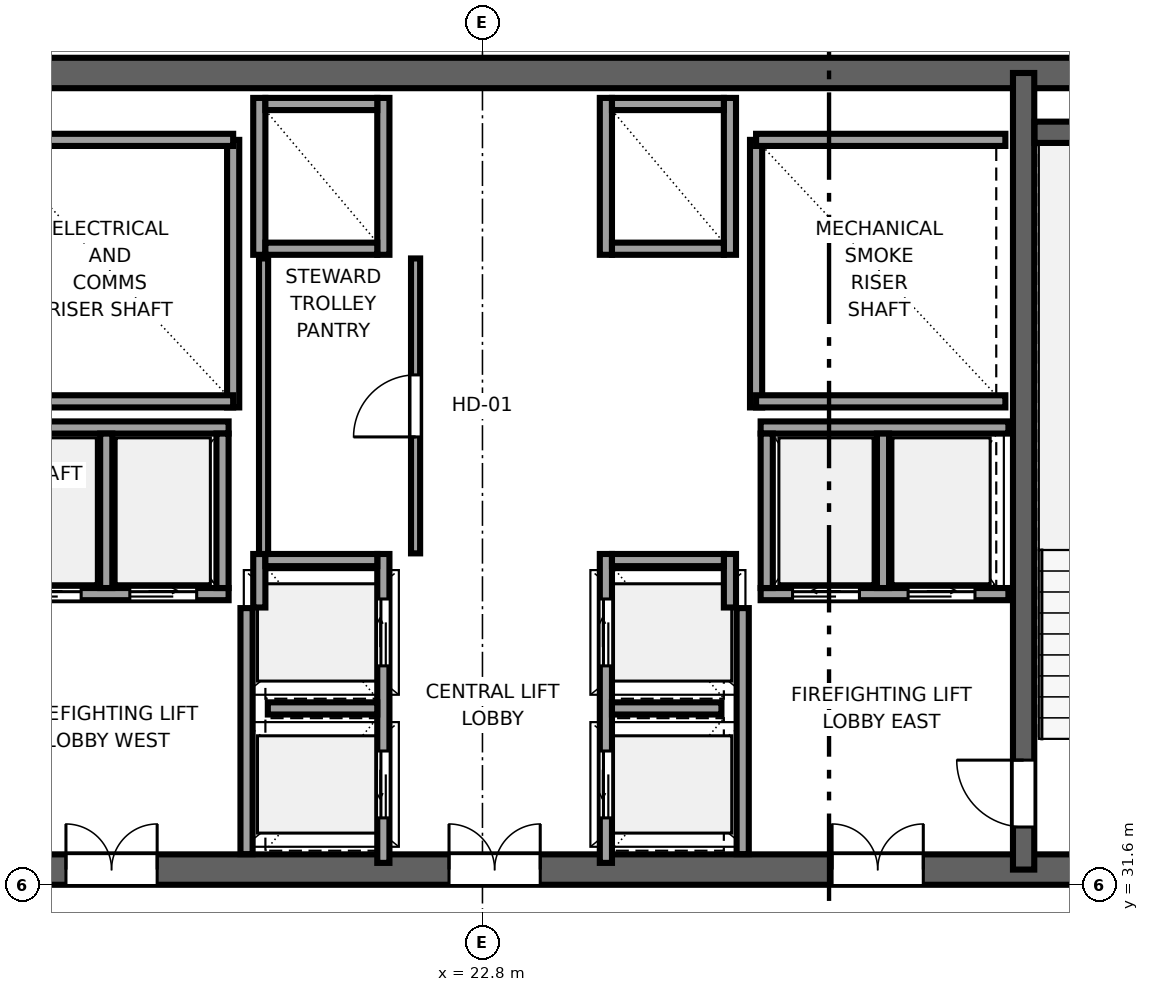
"""IFC4 building model, lengths in metres.
Left out: names, types, materials, properties, quantities, classifications, styles, units other than length and angle.
Written with IfcOpenShell. Run it as: python <this file> out.ifc"""

import sys

from ifc_helpers import new_model, si_unit, direction, frame, frame_2d, origin, place, context, subcontext, project, spatial, rectangle, extrude, source, transform, mapped, element, fill, save


model = new_model("IFC4")
c1 = context("Model", 3, precision=1e-05, world=origin(), true_north=direction((0.0, 1.0)))
c2 = subcontext(c1, "Body", "Model", "MODEL_VIEW")
j1 = project(units=[si_unit("LENGTHUNIT", "METRE"), si_unit("PLANEANGLEUNIT", "RADIAN")], contexts=[c1])
p1 = place(None, origin())
s1 = spatial("IfcSite", under=j1, at=p1, CompositionType="ELEMENT")
p2 = place(p1, origin())
s2 = spatial("IfcBuilding", under=s1, at=p2, CompositionType="ELEMENT")
p3 = place(p2, frame((0.0, 0.0, 220.35)))
s3 = spatial("IfcBuildingStorey", under=s2, at=p3, CompositionType="ELEMENT", Elevation=220.35)
p4 = place(p3, frame((10.0, 31.85, 0.0), z_axis=(0.0, 0.0, 1.0), x_axis=(1.0, 0.0, 0.0)))
e1 = element("IfcWall", 1, at=p4, inside=s3, PredefinedType="SHEAR", context=c2, shape_type="SweptSolid", body=[
    extrude(rectangle(XDim=26.0, YDim=0.5, at=frame_2d((13.0, 0.0))), origin(), (0.0, 0.0, 1.0), 3.55),
])
p5 = place(p4, frame((7.45, 0.0, 0.0), z_axis=(0.0, 0.0, 1.0), x_axis=(-1.0, 0.0, 0.0)))
e2 = element("IfcOpeningElement", 2, at=p5, cuts=e1, PredefinedType="OPENING", context=c2, shape_type="SweptSolid", body=[
    extrude(rectangle(XDim=1.5, YDim=2.04, at=frame_2d((0.75, 1.02))), frame((0.0, 0.26, 0.0), z_axis=(0.0, -1.0, 0.0), x_axis=(1.0, 0.0, 0.0)), (0.0, 0.0, 1.0), 0.52),
])
p6 = place(p4, frame((13.75, 0.0, 0.0), z_axis=(0.0, 0.0, 1.0), x_axis=(-1.0, 0.0, 0.0)))
e3 = element("IfcOpeningElement", 3, at=p6, cuts=e1, PredefinedType="OPENING", context=c2, shape_type="SweptSolid", body=[
    extrude(rectangle(XDim=1.5, YDim=2.04, at=frame_2d((0.75, 1.02))), frame((0.0, 0.26, 0.0), z_axis=(0.0, -1.0, 0.0), x_axis=(1.0, 0.0, 0.0)), (0.0, 0.0, 1.0), 0.52),
])
p7 = place(p4, frame((20.05, 0.0, 0.0), z_axis=(0.0, 0.0, 1.0), x_axis=(-1.0, 0.0, 0.0)))
e4 = element("IfcOpeningElement", 4, at=p7, cuts=e1, PredefinedType="OPENING", context=c2, shape_type="SweptSolid", body=[
    extrude(rectangle(XDim=1.5, YDim=2.04, at=frame_2d((0.75, 1.02))), frame((0.0, 0.26, 0.0), z_axis=(0.0, -1.0, 0.0), x_axis=(1.0, 0.0, 0.0)), (0.0, 0.0, 1.0), 0.52),
])
p8 = place(p3, frame((10.0, 44.95, 0.0), z_axis=(0.0, 0.0, 1.0), x_axis=(1.0, 0.0, 0.0)))
e5 = element("IfcWall", 5, at=p8, inside=s3, PredefinedType="SHEAR", context=c2, shape_type="SweptSolid", body=[
    extrude(rectangle(XDim=26.0, YDim=0.5, at=frame_2d((13.0, 0.0))), origin(), (0.0, 0.0, 1.0), 3.55),
])
p9 = place(p3, frame((31.7, 31.85, 0.0), z_axis=(0.0, 0.0, 1.0), x_axis=(0.0, 1.0, 0.0)))
e6 = element("IfcWall", 6, at=p9, inside=s3, PredefinedType="SHEAR", context=c2, shape_type="SweptSolid", body=[
    extrude(rectangle(XDim=13.1, YDim=0.35, at=frame_2d((6.55, 0.0))), origin(), (0.0, 0.0, 1.0), 3.55),
])
p10 = place(p9, frame((1.8, 0.0, 0.0), z_axis=(0.0, 0.0, 1.0), x_axis=(-1.0, 0.0, 0.0)))
e7 = element("IfcOpeningElement", 7, at=p10, cuts=e6, PredefinedType="OPENING", context=c2, shape_type="SweptSolid", body=[
    extrude(rectangle(XDim=1.1, YDim=2.12, at=frame_2d((0.55, 1.06))), frame((0.0, 0.185, 0.0), z_axis=(0.0, -1.0, 0.0), x_axis=(1.0, 0.0, 0.0)), (0.0, 0.0, 1.0), 0.37),
])
p11 = place(p3, frame((31.88, 43.975, 0.0), z_axis=(0.0, 0.0, 1.0), x_axis=(1.0, 0.0, 0.0)))
e8 = element("IfcWall", 8, at=p11, inside=s3, PredefinedType="SHEAR", context=c2, shape_type="SweptSolid", body=[
    extrude(rectangle(XDim=3.6, YDim=0.35, at=frame_2d((1.8, 0.0))), origin(), (0.0, 0.0, 1.0), 3.55),
])
p12 = place(p3, frame((18.7, 39.45, 0.0), z_axis=(0.0, 0.0, 1.0), x_axis=(0.0, 1.0, 0.0)))
e9 = element("IfcWall", 9, at=p12, inside=s3, PredefinedType="SOLIDWALL", context=c2, shape_type="SweptSolid", body=[
    extrude(rectangle(XDim=4.4, YDim=0.2, at=frame_2d((2.2, 0.0))), origin(), (0.0, 0.0, 1.0), 3.37),
])
for number, where, z_axis, x_axis in (
    (10, (14.6, 39.55, 0.0), (0.0, 0.0, 1.0), (1.0, 0.0, 0.0)),
    (11, (14.6, 43.85, 0.0), (0.0, 0.0, 1.0), (1.0, 0.0, 0.0)),
):
    element("IfcWall", number, at=place(p3, frame(where, z_axis=z_axis, x_axis=x_axis)), inside=s3, PredefinedType="SOLIDWALL", context=c2, shape_type="SweptSolid", body=[
        extrude(rectangle(XDim=4.1, YDim=0.2, at=frame_2d((2.05, 0.0))), origin(), (0.0, 0.0, 1.0), 3.37),
    ])
p13 = place(p3, frame((27.3, 39.45, 0.0), z_axis=(0.0, 0.0, 1.0), x_axis=(0.0, 1.0, 0.0)))
e12 = element("IfcWall", 12, at=p13, inside=s3, PredefinedType="SOLIDWALL", context=c2, shape_type="SweptSolid", body=[
    extrude(rectangle(XDim=4.4, YDim=0.2, at=frame_2d((2.2, 0.0))), origin(), (0.0, 0.0, 1.0), 3.37),
])
for number, where, z_axis, x_axis in (
    (13, (27.3, 39.55, 0.0), (0.0, 0.0, 1.0), (1.0, 0.0, 0.0)),
    (14, (27.3, 43.85, 0.0), (0.0, 0.0, 1.0), (1.0, 0.0, 0.0)),
):
    element("IfcWall", number, at=place(p3, frame(where, z_axis=z_axis, x_axis=x_axis)), inside=s3, PredefinedType="SOLIDWALL", context=c2, shape_type="SweptSolid", body=[
        extrude(rectangle(XDim=4.1, YDim=0.2, at=frame_2d((2.05, 0.0))), origin(), (0.0, 0.0, 1.0), 3.37),
    ])
for number, where, z_axis, x_axis in (
    (15, (18.92, 32.104, 0.0), (0.0, 0.0, 1.0), (0.0, 1.0, 0.0)),
    (16, (27.08, 32.104, 0.0), (0.0, 0.0, 1.0), (0.0, 1.0, 0.0)),
):
    element("IfcWall", number, at=place(p3, frame(where, z_axis=z_axis, x_axis=x_axis)), inside=s3, PredefinedType="SOLIDWALL", context=c2, shape_type="SweptSolid", body=[
        extrude(rectangle(XDim=4.046, YDim=0.2, at=frame_2d((2.023, 0.0))), origin(), (0.0, 0.0, 1.0), 3.37),
    ])
p14 = place(p3, frame((21.17, 31.96, 0.0), z_axis=(0.0, 0.0, 1.0), x_axis=(0.0, 1.0, 0.0)))
e17 = element("IfcWall", 17, at=p14, inside=s3, PredefinedType="SOLIDWALL", context=c2, shape_type="SweptSolid", body=[
    extrude(rectangle(XDim=5.08, YDim=0.2, at=frame_2d((2.54, 0.0))), origin(), (0.0, 0.0, 1.0), 3.37),
])
p15 = place(p14, frame((0.74, 0.0, 0.0)))
e18 = element("IfcOpeningElement", 18, at=p15, cuts=e17, PredefinedType="OPENING", context=c2, shape_type="SweptSolid", body=[
    extrude(rectangle(XDim=1.1, YDim=2.12, at=frame_2d((0.55, 1.06))), frame((0.0, 0.11, 0.0), z_axis=(0.0, -1.0, 0.0), x_axis=(1.0, 0.0, 0.0)), (0.0, 0.0, 1.0), 0.22),
])
p16 = place(p14, frame((3.24, 0.0, 0.0)))
e19 = element("IfcOpeningElement", 19, at=p16, cuts=e17, PredefinedType="OPENING", context=c2, shape_type="SweptSolid", body=[
    extrude(rectangle(XDim=1.1, YDim=2.12, at=frame_2d((0.55, 1.06))), frame((0.0, 0.11, 0.0), z_axis=(0.0, -1.0, 0.0), x_axis=(1.0, 0.0, 0.0)), (0.0, 0.0, 1.0), 0.22),
])
p17 = place(p3, frame((19.13, 36.16, 0.0), z_axis=(0.0, 0.0, 1.0), x_axis=(0.0, 1.0, 0.0)))
e20 = element("IfcWall", 20, at=p17, inside=s3, PredefinedType="SOLIDWALL", context=c2, shape_type="SweptSolid", body=[
    extrude(rectangle(XDim=0.88, YDim=0.2, at=frame_2d((0.44, 0.0))), origin(), (0.0, 0.0, 1.0), 3.37),
])
p18 = place(p3, frame((19.23, 36.94, 0.0), z_axis=(0.0, 0.0, 1.0), x_axis=(1.0, 0.0, 0.0)))
e21 = element("IfcWall", 21, at=p18, inside=s3, PredefinedType="SOLIDWALL", context=c2, shape_type="SweptSolid", body=[
    extrude(rectangle(XDim=1.84, YDim=0.2, at=frame_2d((0.92, 0.0))), origin(), (0.0, 0.0, 1.0), 3.37),
])
p19 = place(p3, frame((19.27, 34.5, 0.0), z_axis=(0.0, 0.0, 1.0), x_axis=(1.0, 0.0, 0.0)))
e22 = element("IfcWall", 22, at=p19, inside=s3, PredefinedType="SOLIDWALL", context=c2, shape_type="SweptSolid", body=[
    extrude(rectangle(XDim=1.8, YDim=0.2, at=frame_2d((0.9, 0.0))), origin(), (0.0, 0.0, 1.0), 3.37),
])
for number, where, z_axis, x_axis in (
    (23, (21.17, 41.96, 0.0), (0.0, 0.0, 1.0), (0.0, 1.0, 0.0)),
    (24, (19.13, 41.96, 0.0), (0.0, 0.0, 1.0), (0.0, 1.0, 0.0)),
):
    element("IfcWall", number, at=place(p3, frame(where, z_axis=z_axis, x_axis=x_axis)), inside=s3, PredefinedType="SOLIDWALL", context=c2, shape_type="SweptSolid", body=[
        extrude(rectangle(XDim=2.58, YDim=0.2, at=frame_2d((1.29, 0.0))), origin(), (0.0, 0.0, 1.0), 3.37),
    ])
for number, where, z_axis, x_axis in (
    (25, (19.23, 42.06, 0.0), (0.0, 0.0, 1.0), (1.0, 0.0, 0.0)),
    (26, (19.23, 44.44, 0.0), (0.0, 0.0, 1.0), (1.0, 0.0, 0.0)),
):
    element("IfcWall", number, at=place(p3, frame(where, z_axis=z_axis, x_axis=x_axis)), inside=s3, PredefinedType="SOLIDWALL", context=c2, shape_type="SweptSolid", body=[
        extrude(rectangle(XDim=1.84, YDim=0.2, at=frame_2d((0.92, 0.0))), origin(), (0.0, 0.0, 1.0), 3.37),
    ])
p20 = place(p3, frame((27.375, 36.38, 0.0), z_axis=(0.0, 0.0, 1.0), x_axis=(1.0, 0.0, 0.0)))
e27 = element("IfcWall", 27, at=p20, inside=s3, PredefinedType="SOLIDWALL", context=c2, shape_type="SweptSolid", body=[
    extrude(rectangle(XDim=4.075, YDim=0.2, at=frame_2d((2.038, 0.0))), origin(), (0.0, 0.0, 1.0), 3.37),
])
p21 = place(p20, frame((0.525, 0.0, 0.0)))
e28 = element("IfcOpeningElement", 28, at=p21, cuts=e27, PredefinedType="OPENING", context=c2, shape_type="SweptSolid", body=[
    extrude(rectangle(XDim=1.1, YDim=2.12, at=frame_2d((0.55, 1.06))), frame((0.0, 0.11, 0.0), z_axis=(0.0, -1.0, 0.0), x_axis=(1.0, 0.0, 0.0)), (0.0, 0.0, 1.0), 0.22),
])
p22 = place(p20, frame((2.425, 0.0, 0.0)))
e29 = element("IfcOpeningElement", 29, at=p22, cuts=e27, PredefinedType="OPENING", context=c2, shape_type="SweptSolid", body=[
    extrude(rectangle(XDim=1.1, YDim=2.12, at=frame_2d((0.55, 1.06))), frame((0.0, 0.11, 0.0), z_axis=(0.0, -1.0, 0.0), x_axis=(1.0, 0.0, 0.0)), (0.0, 0.0, 1.0), 0.22),
])
p23 = place(p3, frame((27.375, 39.12, 0.0), z_axis=(0.0, 0.0, 1.0), x_axis=(1.0, 0.0, 0.0)))
e30 = element("IfcWall", 30, at=p23, inside=s3, PredefinedType="SOLIDWALL", context=c2, shape_type="SweptSolid", body=[
    extrude(rectangle(XDim=4.075, YDim=0.2, at=frame_2d((2.038, 0.0))), origin(), (0.0, 0.0, 1.0), 3.37),
])
for number, where, z_axis, x_axis in (
    (31, (27.475, 36.48, 0.0), (0.0, 0.0, 1.0), (0.0, 1.0, 0.0)),
    (32, (29.387, 36.48, 0.0), (0.0, 0.0, 1.0), (0.0, 1.0, 0.0)),
):
    element("IfcWall", number, at=place(p3, frame(where, z_axis=z_axis, x_axis=x_axis)), inside=s3, PredefinedType="SOLIDWALL", context=c2, shape_type="SweptSolid", body=[
        extrude(rectangle(XDim=2.54, YDim=0.2, at=frame_2d((1.27, 0.0))), origin(), (0.0, 0.0, 1.0), 3.37),
    ])
p24 = place(p3, frame((14.55, 36.38, 0.0), z_axis=(0.0, 0.0, 1.0), x_axis=(1.0, 0.0, 0.0)))
e33 = element("IfcWall", 33, at=p24, inside=s3, PredefinedType="SOLIDWALL", context=c2, shape_type="SweptSolid", body=[
    extrude(rectangle(XDim=4.075, YDim=0.2, at=frame_2d((2.038, 0.0))), origin(), (0.0, 0.0, 1.0), 3.37),
])
p25 = place(p24, frame((0.55, 0.0, 0.0)))
e34 = element("IfcOpeningElement", 34, at=p25, cuts=e33, PredefinedType="OPENING", context=c2, shape_type="SweptSolid", body=[
    extrude(rectangle(XDim=1.1, YDim=2.12, at=frame_2d((0.55, 1.06))), frame((0.0, 0.11, 0.0), z_axis=(0.0, -1.0, 0.0), x_axis=(1.0, 0.0, 0.0)), (0.0, 0.0, 1.0), 0.22),
])
p26 = place(p24, frame((2.45, 0.0, 0.0)))
e35 = element("IfcOpeningElement", 35, at=p26, cuts=e33, PredefinedType="OPENING", context=c2, shape_type="SweptSolid", body=[
    extrude(rectangle(XDim=1.1, YDim=2.12, at=frame_2d((0.55, 1.06))), frame((0.0, 0.11, 0.0), z_axis=(0.0, -1.0, 0.0), x_axis=(1.0, 0.0, 0.0)), (0.0, 0.0, 1.0), 0.22),
])
p27 = place(p3, frame((14.55, 39.12, 0.0), z_axis=(0.0, 0.0, 1.0), x_axis=(1.0, 0.0, 0.0)))
e36 = element("IfcWall", 36, at=p27, inside=s3, PredefinedType="SOLIDWALL", context=c2, shape_type="SweptSolid", body=[
    extrude(rectangle(XDim=4.075, YDim=0.2, at=frame_2d((2.038, 0.0))), origin(), (0.0, 0.0, 1.0), 3.37),
])
for number, where, z_axis, x_axis in (
    (37, (18.525, 36.48, 0.0), (0.0, 0.0, 1.0), (0.0, 1.0, 0.0)),
    (38, (16.613, 36.48, 0.0), (0.0, 0.0, 1.0), (0.0, 1.0, 0.0)),
):
    element("IfcWall", number, at=place(p3, frame(where, z_axis=z_axis, x_axis=x_axis)), inside=s3, PredefinedType="SOLIDWALL", context=c2, shape_type="SweptSolid", body=[
        extrude(rectangle(XDim=2.54, YDim=0.2, at=frame_2d((1.27, 0.0))), origin(), (0.0, 0.0, 1.0), 3.37),
    ])
p28 = place(p3, frame((24.83, 31.96, 0.0), z_axis=(0.0, 0.0, 1.0), x_axis=(0.0, 1.0, 0.0)))
e39 = element("IfcWall", 39, at=p28, inside=s3, PredefinedType="SOLIDWALL", context=c2, shape_type="SweptSolid", body=[
    extrude(rectangle(XDim=5.08, YDim=0.2, at=frame_2d((2.54, 0.0))), origin(), (0.0, 0.0, 1.0), 3.37),
])
p29 = place(p28, frame((0.74, 0.0, 0.0)))
e40 = element("IfcOpeningElement", 40, at=p29, cuts=e39, PredefinedType="OPENING", context=c2, shape_type="SweptSolid", body=[
    extrude(rectangle(XDim=1.1, YDim=2.12, at=frame_2d((0.55, 1.06))), frame((0.0, 0.11, 0.0), z_axis=(0.0, -1.0, 0.0), x_axis=(1.0, 0.0, 0.0)), (0.0, 0.0, 1.0), 0.22),
])
p30 = place(p28, frame((3.24, 0.0, 0.0)))
e41 = element("IfcOpeningElement", 41, at=p30, cuts=e39, PredefinedType="OPENING", context=c2, shape_type="SweptSolid", body=[
    extrude(rectangle(XDim=1.1, YDim=2.12, at=frame_2d((0.55, 1.06))), frame((0.0, 0.11, 0.0), z_axis=(0.0, -1.0, 0.0), x_axis=(1.0, 0.0, 0.0)), (0.0, 0.0, 1.0), 0.22),
])
p31 = place(p3, frame((26.87, 36.16, 0.0), z_axis=(0.0, 0.0, 1.0), x_axis=(0.0, 1.0, 0.0)))
e42 = element("IfcWall", 42, at=p31, inside=s3, PredefinedType="SOLIDWALL", context=c2, shape_type="SweptSolid", body=[
    extrude(rectangle(XDim=0.88, YDim=0.2, at=frame_2d((0.44, 0.0))), origin(), (0.0, 0.0, 1.0), 3.37),
])
p32 = place(p3, frame((24.93, 36.94, 0.0), z_axis=(0.0, 0.0, 1.0), x_axis=(1.0, 0.0, 0.0)))
e43 = element("IfcWall", 43, at=p32, inside=s3, PredefinedType="SOLIDWALL", context=c2, shape_type="SweptSolid", body=[
    extrude(rectangle(XDim=1.84, YDim=0.2, at=frame_2d((0.92, 0.0))), origin(), (0.0, 0.0, 1.0), 3.37),
])
p33 = place(p3, frame((24.93, 34.5, 0.0), z_axis=(0.0, 0.0, 1.0), x_axis=(1.0, 0.0, 0.0)))
e44 = element("IfcWall", 44, at=p33, inside=s3, PredefinedType="SOLIDWALL", context=c2, shape_type="SweptSolid", body=[
    extrude(rectangle(XDim=1.8, YDim=0.2, at=frame_2d((0.9, 0.0))), origin(), (0.0, 0.0, 1.0), 3.37),
])
for number, where, z_axis, x_axis in (
    (45, (24.83, 41.96, 0.0), (0.0, 0.0, 1.0), (0.0, 1.0, 0.0)),
    (46, (26.87, 41.96, 0.0), (0.0, 0.0, 1.0), (0.0, 1.0, 0.0)),
):
    element("IfcWall", number, at=place(p3, frame(where, z_axis=z_axis, x_axis=x_axis)), inside=s3, PredefinedType="SOLIDWALL", context=c2, shape_type="SweptSolid", body=[
        extrude(rectangle(XDim=2.58, YDim=0.2, at=frame_2d((1.29, 0.0))), origin(), (0.0, 0.0, 1.0), 3.37),
    ])
for number, where, z_axis, x_axis in (
    (47, (24.93, 42.06, 0.0), (0.0, 0.0, 1.0), (1.0, 0.0, 0.0)),
    (48, (24.93, 44.44, 0.0), (0.0, 0.0, 1.0), (1.0, 0.0, 0.0)),
):
    element("IfcWall", number, at=place(p3, frame(where, z_axis=z_axis, x_axis=x_axis)), inside=s3, PredefinedType="SOLIDWALL", context=c2, shape_type="SweptSolid", body=[
        extrude(rectangle(XDim=1.84, YDim=0.2, at=frame_2d((0.92, 0.0))), origin(), (0.0, 0.0, 1.0), 3.37),
    ])
p34 = place(p3, frame((21.7, 37.05, 0.0), z_axis=(0.0, 0.0, 1.0), x_axis=(0.0, 1.0, 0.0)))
e49 = element("IfcWall", 49, at=p34, inside=s3, PredefinedType="PARTITIONING", context=c2, shape_type="SweptSolid", body=[
    extrude(rectangle(XDim=4.85, YDim=0.15, at=frame_2d((2.425, 0.0))), origin(), (0.0, 0.0, 1.0), 3.37),
])
p35 = place(p34, frame((1.915, 0.0, 0.0)))
e50 = element("IfcOpeningElement", 50, at=p35, cuts=e49, PredefinedType="OPENING", context=c2, shape_type="SweptSolid", body=[
    extrude(rectangle(XDim=1.02, YDim=2.03, at=frame_2d((0.51, 1.015))), frame((0.0, 0.085, 0.0), z_axis=(0.0, -1.0, 0.0), x_axis=(1.0, 0.0, 0.0)), (0.0, 0.0, 1.0), 0.17),
])
p36 = place(p3, frame((19.2, 37.04, 0.0), z_axis=(0.0, 0.0, 1.0), x_axis=(0.0, 1.0, 0.0)))
e51 = element("IfcWall", 51, at=p36, inside=s3, PredefinedType="PARTITIONING", context=c2, shape_type="SweptSolid", body=[
    extrude(rectangle(XDim=4.86, YDim=0.15, at=frame_2d((2.43, 0.0))), origin(), (0.0, 0.0, 1.0), 3.37),
])
m1 = source(origin(), c2, "Body", "SweptSolid", [
    extrude(rectangle(XDim=1.1, YDim=2.12, at=frame_2d((0.55, 1.06))), frame((0.0, 0.025, 0.0), z_axis=(0.0, -1.0, 0.0), x_axis=(1.0, 0.0, 0.0)), (0.0, 0.0, 1.0), 0.05),
])
p37 = place(p10, origin())
e52 = element("IfcDoor", 52, at=p37, inside=s3, OperationType="SINGLE_SWING_RIGHT", PredefinedType="DOOR", context=c2, shape_type="MappedRepresentation", body=[
    mapped(m1, transform((0.0, 0.0, 0.0), x_axis=(1.0, 0.0, 0.0), y_axis=(0.0, 1.0, 0.0), z_axis=(0.0, 0.0, 1.0), scale=1.0)),
])
fill(e7, e52)
m2 = source(origin(), c2, "Body", "SweptSolid", [
    extrude(rectangle(XDim=1.5, YDim=2.04, at=frame_2d((0.75, 1.02))), frame((0.0, 0.025, 0.0), z_axis=(0.0, -1.0, 0.0), x_axis=(1.0, 0.0, 0.0)), (0.0, 0.0, 1.0), 0.05),
])
p38 = place(p5, origin())
e53 = element("IfcDoor", 53, at=p38, inside=s3, OperationType="DOUBLE_DOOR_SINGLE_SWING", PredefinedType="DOOR", context=c2, shape_type="MappedRepresentation", body=[
    mapped(m2, transform((0.0, 0.0, 0.0), x_axis=(1.0, 0.0, 0.0), y_axis=(0.0, 1.0, 0.0), z_axis=(0.0, 0.0, 1.0), scale=1.0)),
])
fill(e2, e53)
p39 = place(p6, origin())
e54 = element("IfcDoor", 54, at=p39, inside=s3, OperationType="DOUBLE_DOOR_SINGLE_SWING", PredefinedType="DOOR", context=c2, shape_type="MappedRepresentation", body=[
    mapped(m2, transform((0.0, 0.0, 0.0), x_axis=(1.0, 0.0, 0.0), y_axis=(0.0, 1.0, 0.0), z_axis=(0.0, 0.0, 1.0), scale=1.0)),
])
fill(e3, e54)
p40 = place(p7, origin())
e55 = element("IfcDoor", 55, at=p40, inside=s3, OperationType="DOUBLE_DOOR_SINGLE_SWING", PredefinedType="DOOR", context=c2, shape_type="MappedRepresentation", body=[
    mapped(m2, transform((0.0, 0.0, 0.0), x_axis=(1.0, 0.0, 0.0), y_axis=(0.0, 1.0, 0.0), z_axis=(0.0, 0.0, 1.0), scale=1.0)),
])
fill(e4, e55)
m3 = source(origin(), c2, "Body", "SweptSolid", [
    extrude(rectangle(XDim=1.1, YDim=2.12, at=frame_2d((0.55, 1.06))), frame((0.0, 0.025, 0.0), z_axis=(0.0, -1.0, 0.0), x_axis=(1.0, 0.0, 0.0)), (0.0, 0.0, 1.0), 0.05),
])
p41 = place(p15, origin())
e56 = element("IfcDoor", 56, at=p41, inside=s3, OperationType="SLIDING_TO_LEFT", PredefinedType="DOOR", context=c2, shape_type="MappedRepresentation", body=[
    mapped(m3, transform((0.0, 0.0, 0.0), x_axis=(1.0, 0.0, 0.0), y_axis=(0.0, 1.0, 0.0), z_axis=(0.0, 0.0, 1.0), scale=1.0)),
])
fill(e18, e56)
p42 = place(p16, origin())
e57 = element("IfcDoor", 57, at=p42, inside=s3, OperationType="SLIDING_TO_RIGHT", PredefinedType="DOOR", context=c2, shape_type="MappedRepresentation", body=[
    mapped(m3, transform((0.0, 0.0, 0.0), x_axis=(1.0, 0.0, 0.0), y_axis=(0.0, 1.0, 0.0), z_axis=(0.0, 0.0, 1.0), scale=1.0)),
])
fill(e19, e57)
p43 = place(p21, origin())
e58 = element("IfcDoor", 58, at=p43, inside=s3, OperationType="SLIDING_TO_LEFT", PredefinedType="DOOR", context=c2, shape_type="MappedRepresentation", body=[
    mapped(m3, transform((0.0, 0.0, 0.0), x_axis=(1.0, 0.0, 0.0), y_axis=(0.0, 1.0, 0.0), z_axis=(0.0, 0.0, 1.0), scale=1.0)),
])
fill(e28, e58)
p44 = place(p22, origin())
e59 = element("IfcDoor", 59, at=p44, inside=s3, OperationType="SLIDING_TO_RIGHT", PredefinedType="DOOR", context=c2, shape_type="MappedRepresentation", body=[
    mapped(m3, transform((0.0, 0.0, 0.0), x_axis=(1.0, 0.0, 0.0), y_axis=(0.0, 1.0, 0.0), z_axis=(0.0, 0.0, 1.0), scale=1.0)),
])
fill(e29, e59)
p45 = place(p25, origin())
e60 = element("IfcDoor", 60, at=p45, inside=s3, OperationType="SLIDING_TO_LEFT", PredefinedType="DOOR", context=c2, shape_type="MappedRepresentation", body=[
    mapped(m3, transform((0.0, 0.0, 0.0), x_axis=(1.0, 0.0, 0.0), y_axis=(0.0, 1.0, 0.0), z_axis=(0.0, 0.0, 1.0), scale=1.0)),
])
fill(e34, e60)
p46 = place(p26, origin())
e61 = element("IfcDoor", 61, at=p46, inside=s3, OperationType="SLIDING_TO_RIGHT", PredefinedType="DOOR", context=c2, shape_type="MappedRepresentation", body=[
    mapped(m3, transform((0.0, 0.0, 0.0), x_axis=(1.0, 0.0, 0.0), y_axis=(0.0, 1.0, 0.0), z_axis=(0.0, 0.0, 1.0), scale=1.0)),
])
fill(e35, e61)
p47 = place(p29, origin())
e62 = element("IfcDoor", 62, at=p47, inside=s3, OperationType="SLIDING_TO_LEFT", PredefinedType="DOOR", context=c2, shape_type="MappedRepresentation", body=[
    mapped(m3, transform((0.0, 0.0, 0.0), x_axis=(1.0, 0.0, 0.0), y_axis=(0.0, 1.0, 0.0), z_axis=(0.0, 0.0, 1.0), scale=1.0)),
])
fill(e40, e62)
p48 = place(p30, origin())
e63 = element("IfcDoor", 63, at=p48, inside=s3, OperationType="SLIDING_TO_RIGHT", PredefinedType="DOOR", context=c2, shape_type="MappedRepresentation", body=[
    mapped(m3, transform((0.0, 0.0, 0.0), x_axis=(1.0, 0.0, 0.0), y_axis=(0.0, 1.0, 0.0), z_axis=(0.0, 0.0, 1.0), scale=1.0)),
])
fill(e41, e63)
m4 = source(origin(), c2, "Body", "SweptSolid", [
    extrude(rectangle(XDim=1.02, YDim=2.03, at=frame_2d((0.51, 1.015))), frame((0.0, 0.025, 0.0), z_axis=(0.0, -1.0, 0.0), x_axis=(1.0, 0.0, 0.0)), (0.0, 0.0, 1.0), 0.05),
])
p49 = place(p35, origin())
e64 = element("IfcDoor", 64, at=p49, inside=s3, OperationType="SINGLE_SWING_LEFT", PredefinedType="DOOR", context=c2, shape_type="MappedRepresentation", body=[
    mapped(m4, transform((0.0, 0.0, 0.0), x_axis=(1.0, 0.0, 0.0), y_axis=(0.0, 1.0, 0.0), z_axis=(0.0, 0.0, 1.0), scale=1.0)),
])
fill(e50, e64)
save(model, sys.argv[1])
